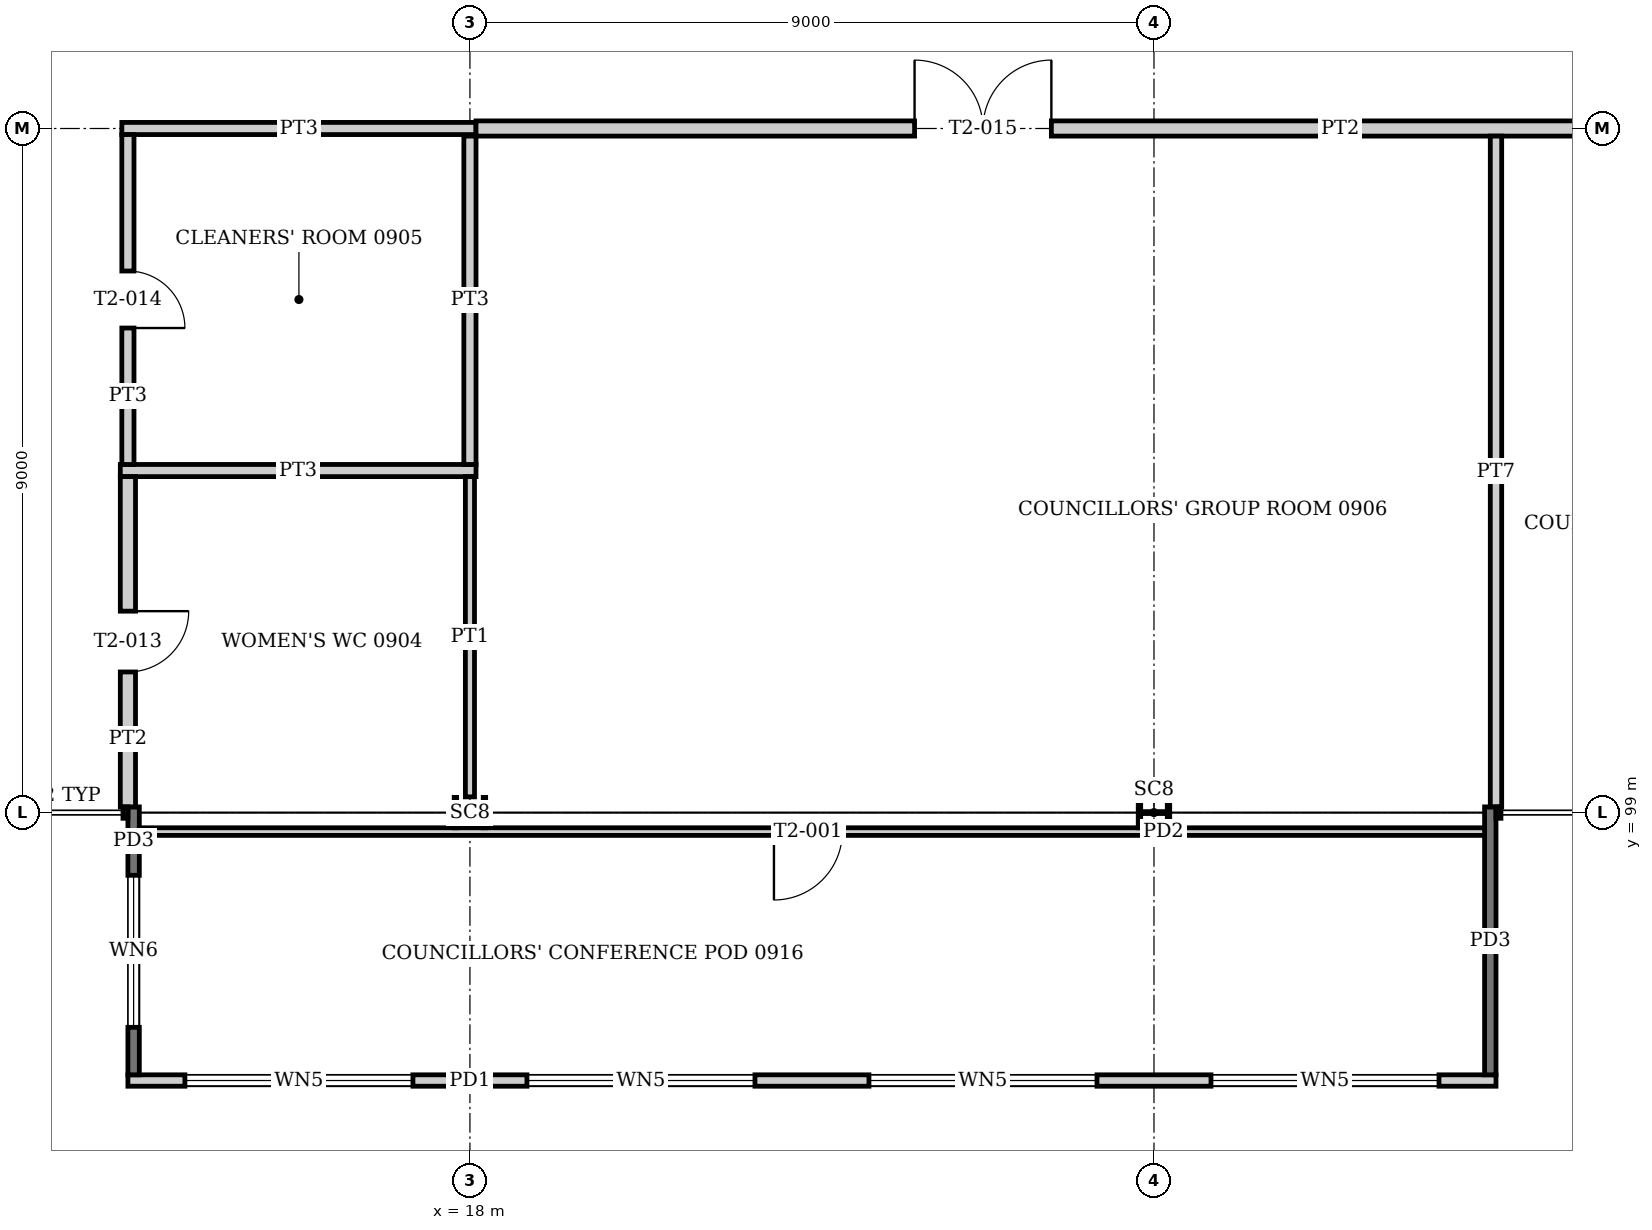
"""IFC4 building model, lengths in metres.
Left out: names, types, materials, properties, quantities, classifications, styles, units other than length and angle.
Written with IfcOpenShell. Run it as: python <this file> out.ifc"""

import sys

from ifc_helpers import new_model, si_unit, direction, frame, frame_2d, origin, origin_2d, place, context, subcontext, project, spatial, rectangle, i_section, extrude, element, fill, save


model = new_model("IFC4")
c1 = context("Model", 3, precision=1e-05, world=origin(), true_north=direction((0.0, 1.0)))
c2 = subcontext(c1, "Body", "Model", "MODEL_VIEW")
j1 = project(units=[si_unit("LENGTHUNIT", "METRE"), si_unit("PLANEANGLEUNIT", "RADIAN")], contexts=[c1])
p1 = place(None, origin())
s1 = spatial("IfcSite", under=j1, at=p1, CompositionType="ELEMENT")
p2 = place(p1, origin())
s2 = spatial("IfcBuilding", under=s1, at=p2, CompositionType="ELEMENT")
p3 = place(p2, frame((0.0, 0.0, 39.2)))
s3 = spatial("IfcBuildingStorey", under=s2, at=p3, CompositionType="ELEMENT", Elevation=39.2)
for number, where, z_axis, x_axis in (
    (1, (18.0, 99.0, 0.0), (0.0, 0.0, 1.0), (0.0, 1.0, 0.0)),
    (2, (27.0, 99.0, 0.0), (0.0, 0.0, 1.0), (0.0, 1.0, 0.0)),
):
    element("IfcColumn", number, at=place(p3, frame(where, z_axis=z_axis, x_axis=x_axis)), inside=s3, PredefinedType="COLUMN", context=c2, shape_type="SweptSolid", body=[
        extrude(i_section(OverallWidth=0.4, OverallDepth=0.414, WebThickness=0.025, FlangeThickness=0.032, at=origin_2d()), origin(), (0.0, 0.0, 1.0), 4.0),
    ])
p4 = place(p3, frame((13.5, 95.475, 0.0), z_axis=(0.0, 0.0, 1.0), x_axis=(1.0, 0.0, 0.0)))
e3 = element("IfcWall", 3, at=p4, inside=s3, PredefinedType="SOLIDWALL", context=c2, shape_type="SweptSolid", body=[
    extrude(rectangle(XDim=18.0, YDim=0.15, at=frame_2d((9.0, 0.0))), origin(), (0.0, 0.0, 1.0), 2.6),
])
p5 = place(p4, frame((0.75, 0.0, 0.9)))
e4 = element("IfcOpeningElement", 4, at=p5, cuts=e3, PredefinedType="OPENING", context=c2, shape_type="SweptSolid", body=[
    extrude(rectangle(XDim=3.0, YDim=1.4, at=frame_2d((1.5, 0.7))), frame((0.0, 0.085, 0.0), z_axis=(0.0, -1.0, 0.0), x_axis=(1.0, 0.0, 0.0)), (0.0, 0.0, 1.0), 0.17),
])
p6 = place(p4, frame((5.25, 0.0, 0.9)))
e5 = element("IfcOpeningElement", 5, at=p6, cuts=e3, PredefinedType="OPENING", context=c2, shape_type="SweptSolid", body=[
    extrude(rectangle(XDim=3.0, YDim=1.4, at=frame_2d((1.5, 0.7))), frame((0.0, 0.085, 0.0), z_axis=(0.0, -1.0, 0.0), x_axis=(1.0, 0.0, 0.0)), (0.0, 0.0, 1.0), 0.17),
])
p7 = place(p4, frame((9.75, 0.0, 0.9)))
e6 = element("IfcOpeningElement", 6, at=p7, cuts=e3, PredefinedType="OPENING", context=c2, shape_type="SweptSolid", body=[
    extrude(rectangle(XDim=3.0, YDim=1.4, at=frame_2d((1.5, 0.7))), frame((0.0, 0.085, 0.0), z_axis=(0.0, -1.0, 0.0), x_axis=(1.0, 0.0, 0.0)), (0.0, 0.0, 1.0), 0.17),
])
p8 = place(p4, frame((14.25, 0.0, 0.9)))
e7 = element("IfcOpeningElement", 7, at=p8, cuts=e3, PredefinedType="OPENING", context=c2, shape_type="SweptSolid", body=[
    extrude(rectangle(XDim=3.0, YDim=1.4, at=frame_2d((1.5, 0.7))), frame((0.0, 0.085, 0.0), z_axis=(0.0, -1.0, 0.0), x_axis=(1.0, 0.0, 0.0)), (0.0, 0.0, 1.0), 0.17),
])
p9 = place(p3, frame((13.575, 95.55, -0.15), z_axis=(0.0, 0.0, 1.0), x_axis=(0.0, 1.0, 0.0)))
e8 = element("IfcWall", 8, at=p9, inside=s3, PredefinedType="SOLIDWALL", context=c2, shape_type="SweptSolid", body=[
    extrude(rectangle(XDim=3.525, YDim=0.15, at=frame_2d((1.762, 0.0))), origin(), (0.0, 0.0, 1.0), 2.75),
])
p10 = place(p9, frame((0.625, 0.0, 1.05)))
e9 = element("IfcOpeningElement", 9, at=p10, cuts=e8, PredefinedType="OPENING", context=c2, shape_type="SweptSolid", body=[
    extrude(rectangle(XDim=2.0, YDim=1.4, at=frame_2d((1.0, 0.7))), frame((0.0, 0.085, 0.0), z_axis=(0.0, -1.0, 0.0), x_axis=(1.0, 0.0, 0.0)), (0.0, 0.0, 1.0), 0.17),
])
p11 = place(p3, frame((31.425, 95.55, -0.15), z_axis=(0.0, 0.0, 1.0), x_axis=(0.0, 1.0, 0.0)))
e10 = element("IfcWall", 10, at=p11, inside=s3, PredefinedType="SOLIDWALL", context=c2, shape_type="SweptSolid", body=[
    extrude(rectangle(XDim=3.525, YDim=0.15, at=frame_2d((1.762, 0.0))), origin(), (0.0, 0.0, 1.0), 2.75),
])
p12 = place(p3, frame((13.65, 98.75, 0.0), z_axis=(0.0, 0.0, 1.0), x_axis=(1.0, 0.0, 0.0)))
e11 = element("IfcWall", 11, at=p12, inside=s3, PredefinedType="PARTITIONING", context=c2, shape_type="SweptSolid", body=[
    extrude(rectangle(XDim=17.7, YDim=0.1, at=frame_2d((8.85, 0.0))), origin(), (0.0, 0.0, 1.0), 2.6),
])
p13 = place(p12, frame((8.35, 0.0, 0.0)))
e12 = element("IfcOpeningElement", 12, at=p13, cuts=e11, PredefinedType="OPENING", context=c2, shape_type="SweptSolid", body=[
    extrude(rectangle(XDim=0.9, YDim=2.1, at=frame_2d((0.45, 1.05))), frame((0.0, 0.06, 0.0), z_axis=(0.0, -1.0, 0.0), x_axis=(1.0, 0.0, 0.0)), (0.0, 0.0, 1.0), 0.12),
])
p14 = place(p3, frame((13.4, 103.5, 0.0), z_axis=(0.0, 0.0, 1.0), x_axis=(1.0, 0.0, 0.0)))
e13 = element("IfcWall", 13, at=p14, inside=s3, PredefinedType="PARTITIONING", context=c2, shape_type="SweptSolid", body=[
    extrude(rectangle(XDim=4.68, YDim=0.16, at=frame_2d((2.34, 0.0))), origin(), (0.0, 0.0, 1.0), 3.05),
])
p15 = place(p3, frame((13.42, 108.0, 0.0), z_axis=(0.0, 0.0, 1.0), x_axis=(1.0, 0.0, 0.0)))
e14 = element("IfcWall", 14, at=p15, inside=s3, PredefinedType="PARTITIONING", context=c2, shape_type="SweptSolid", body=[
    extrude(rectangle(XDim=4.66, YDim=0.16, at=frame_2d((2.33, 0.0))), origin(), (0.0, 0.0, 1.0), 3.05),
])
p16 = place(p3, frame((18.08, 108.0, 0.0), z_axis=(0.0, 0.0, 1.0), x_axis=(1.0, 0.0, 0.0)))
e15 = element("IfcWall", 15, at=p16, inside=s3, PredefinedType="PARTITIONING", context=c2, shape_type="SweptSolid", body=[
    extrude(rectangle(XDim=22.52, YDim=0.2, at=frame_2d((11.26, 0.0))), origin(), (0.0, 0.0, 1.0), 3.05),
])
p17 = place(p16, frame((5.77, 0.0, 0.0)))
e16 = element("IfcOpeningElement", 16, at=p17, cuts=e15, PredefinedType="OPENING", context=c2, shape_type="SweptSolid", body=[
    extrude(rectangle(XDim=1.8, YDim=2.1, at=frame_2d((0.9, 1.05))), frame((0.0, 0.11, 0.0), z_axis=(0.0, -1.0, 0.0), x_axis=(1.0, 0.0, 0.0)), (0.0, 0.0, 1.0), 0.22),
])
p18 = place(p16, frame((15.17, 0.0, 0.0)))
e17 = element("IfcOpeningElement", 17, at=p18, cuts=e15, PredefinedType="OPENING", context=c2, shape_type="SweptSolid", body=[
    extrude(rectangle(XDim=1.0, YDim=2.1, at=frame_2d((0.5, 1.05))), frame((0.0, 0.11, 0.0), z_axis=(0.0, -1.0, 0.0), x_axis=(1.0, 0.0, 0.0)), (0.0, 0.0, 1.0), 0.22),
])
p19 = place(p16, frame((19.67, 0.0, 0.0)))
e18 = element("IfcOpeningElement", 18, at=p19, cuts=e15, PredefinedType="OPENING", context=c2, shape_type="SweptSolid", body=[
    extrude(rectangle(XDim=1.0, YDim=2.1, at=frame_2d((0.5, 1.05))), frame((0.0, 0.11, 0.0), z_axis=(0.0, -1.0, 0.0), x_axis=(1.0, 0.0, 0.0)), (0.0, 0.0, 1.0), 0.22),
])
p20 = place(p3, frame((13.5, 99.075, 0.0), z_axis=(0.0, 0.0, 1.0), x_axis=(0.0, 1.0, 0.0)))
e19 = element("IfcWall", 19, at=p20, inside=s3, PredefinedType="PARTITIONING", context=c2, shape_type="SweptSolid", body=[
    extrude(rectangle(XDim=4.345, YDim=0.2, at=frame_2d((2.172, 0.0))), origin(), (0.0, 0.0, 1.0), 3.05),
])
p21 = place(p20, frame((1.775, 0.0, 0.0)))
e20 = element("IfcOpeningElement", 20, at=p21, cuts=e19, PredefinedType="OPENING", context=c2, shape_type="SweptSolid", body=[
    extrude(rectangle(XDim=0.8, YDim=2.1, at=frame_2d((0.4, 1.05))), frame((0.0, 0.11, 0.0), z_axis=(0.0, -1.0, 0.0), x_axis=(1.0, 0.0, 0.0)), (0.0, 0.0, 1.0), 0.22),
])
p22 = place(p3, frame((13.5, 103.58, 0.0), z_axis=(0.0, 0.0, 1.0), x_axis=(0.0, 1.0, 0.0)))
e21 = element("IfcWall", 21, at=p22, inside=s3, PredefinedType="PARTITIONING", context=c2, shape_type="SweptSolid", body=[
    extrude(rectangle(XDim=4.34, YDim=0.16, at=frame_2d((2.17, 0.0))), origin(), (0.0, 0.0, 1.0), 3.05),
])
p23 = place(p22, frame((1.795, 0.0, 0.0)))
e22 = element("IfcOpeningElement", 22, at=p23, cuts=e21, PredefinedType="OPENING", context=c2, shape_type="SweptSolid", body=[
    extrude(rectangle(XDim=0.75, YDim=2.1, at=frame_2d((0.375, 1.05))), frame((0.0, 0.09, 0.0), z_axis=(0.0, -1.0, 0.0), x_axis=(1.0, 0.0, 0.0)), (0.0, 0.0, 1.0), 0.18),
])
p24 = place(p3, frame((18.0, 99.207, 0.0), z_axis=(0.0, 0.0, 1.0), x_axis=(0.0, 1.0, 0.0)))
e23 = element("IfcWall", 23, at=p24, inside=s3, PredefinedType="PARTITIONING", context=c2, shape_type="SweptSolid", body=[
    extrude(rectangle(XDim=4.213, YDim=0.12, at=frame_2d((2.106, 0.0))), origin(), (0.0, 0.0, 1.0), 3.05),
])
p25 = place(p3, frame((18.0, 103.58, 0.0), z_axis=(0.0, 0.0, 1.0), x_axis=(0.0, 1.0, 0.0)))
e24 = element("IfcWall", 24, at=p25, inside=s3, PredefinedType="PARTITIONING", context=c2, shape_type="SweptSolid", body=[
    extrude(rectangle(XDim=4.32, YDim=0.16, at=frame_2d((2.16, 0.0))), origin(), (0.0, 0.0, 1.0), 3.05),
])
p26 = place(p3, frame((31.5, 99.075, 0.0), z_axis=(0.0, 0.0, 1.0), x_axis=(0.0, 1.0, 0.0)))
e25 = element("IfcWall", 25, at=p26, inside=s3, PredefinedType="PARTITIONING", context=c2, shape_type="SweptSolid", body=[
    extrude(rectangle(XDim=8.825, YDim=0.15, at=frame_2d((4.413, 0.0))), origin(), (0.0, 0.0, 1.0), 3.05),
])
p27 = place(p5, origin())
e26 = element("IfcWindow", 26, at=p27, inside=s3, PartitioningType="SINGLE_PANEL", PredefinedType="WINDOW", context=c2, shape_type="SweptSolid", body=[
    extrude(rectangle(XDim=3.0, YDim=1.4, at=frame_2d((1.5, 0.7))), frame((0.0, 0.03, 0.0), z_axis=(0.0, -1.0, 0.0), x_axis=(1.0, 0.0, 0.0)), (0.0, 0.0, 1.0), 0.06),
])
fill(e4, e26)
p28 = place(p6, origin())
e27 = element("IfcWindow", 27, at=p28, inside=s3, PartitioningType="SINGLE_PANEL", PredefinedType="WINDOW", context=c2, shape_type="SweptSolid", body=[
    extrude(rectangle(XDim=3.0, YDim=1.4, at=frame_2d((1.5, 0.7))), frame((0.0, 0.03, 0.0), z_axis=(0.0, -1.0, 0.0), x_axis=(1.0, 0.0, 0.0)), (0.0, 0.0, 1.0), 0.06),
])
fill(e5, e27)
p29 = place(p7, origin())
e28 = element("IfcWindow", 28, at=p29, inside=s3, PartitioningType="SINGLE_PANEL", PredefinedType="WINDOW", context=c2, shape_type="SweptSolid", body=[
    extrude(rectangle(XDim=3.0, YDim=1.4, at=frame_2d((1.5, 0.7))), frame((0.0, 0.03, 0.0), z_axis=(0.0, -1.0, 0.0), x_axis=(1.0, 0.0, 0.0)), (0.0, 0.0, 1.0), 0.06),
])
fill(e6, e28)
p30 = place(p8, origin())
e29 = element("IfcWindow", 29, at=p30, inside=s3, PartitioningType="SINGLE_PANEL", PredefinedType="WINDOW", context=c2, shape_type="SweptSolid", body=[
    extrude(rectangle(XDim=3.0, YDim=1.4, at=frame_2d((1.5, 0.7))), frame((0.0, 0.03, 0.0), z_axis=(0.0, -1.0, 0.0), x_axis=(1.0, 0.0, 0.0)), (0.0, 0.0, 1.0), 0.06),
])
fill(e7, e29)
p31 = place(p10, origin())
e30 = element("IfcWindow", 30, at=p31, inside=s3, PartitioningType="SINGLE_PANEL", PredefinedType="WINDOW", context=c2, shape_type="SweptSolid", body=[
    extrude(rectangle(XDim=2.0, YDim=1.4, at=frame_2d((1.0, 0.7))), frame((0.0, 0.03, 0.0), z_axis=(0.0, -1.0, 0.0), x_axis=(1.0, 0.0, 0.0)), (0.0, 0.0, 1.0), 0.06),
])
fill(e9, e30)
p32 = place(p13, frame((0.9, 0.0, 0.0), z_axis=(0.0, 0.0, 1.0), x_axis=(-1.0, 0.0, 0.0)))
e31 = element("IfcDoor", 31, at=p32, inside=s3, OperationType="SINGLE_SWING_RIGHT", PredefinedType="DOOR", context=c2, shape_type="SweptSolid", body=[
    extrude(rectangle(XDim=0.9, YDim=2.1, at=frame_2d((0.45, 1.05))), frame((0.0, 0.025, 0.0), z_axis=(0.0, -1.0, 0.0), x_axis=(1.0, 0.0, 0.0)), (0.0, 0.0, 1.0), 0.05),
])
fill(e12, e31)
p33 = place(p21, frame((0.8, 0.0, 0.0), z_axis=(0.0, 0.0, 1.0), x_axis=(-1.0, 0.0, 0.0)))
e32 = element("IfcDoor", 32, at=p33, inside=s3, OperationType="SINGLE_SWING_LEFT", PredefinedType="DOOR", context=c2, shape_type="SweptSolid", body=[
    extrude(rectangle(XDim=0.8, YDim=2.1, at=frame_2d((0.4, 1.05))), frame((0.0, 0.025, 0.0), z_axis=(0.0, -1.0, 0.0), x_axis=(1.0, 0.0, 0.0)), (0.0, 0.0, 1.0), 0.05),
])
fill(e20, e32)
p34 = place(p23, frame((0.75, 0.0, 0.0), z_axis=(0.0, 0.0, 1.0), x_axis=(-1.0, 0.0, 0.0)))
e33 = element("IfcDoor", 33, at=p34, inside=s3, OperationType="SINGLE_SWING_RIGHT", PredefinedType="DOOR", context=c2, shape_type="SweptSolid", body=[
    extrude(rectangle(XDim=0.75, YDim=2.1, at=frame_2d((0.375, 1.05))), frame((0.0, 0.025, 0.0), z_axis=(0.0, -1.0, 0.0), x_axis=(1.0, 0.0, 0.0)), (0.0, 0.0, 1.0), 0.05),
])
fill(e22, e33)
p35 = place(p17, origin())
e34 = element("IfcDoor", 34, at=p35, inside=s3, OperationType="DOUBLE_DOOR_SINGLE_SWING", PredefinedType="DOOR", context=c2, shape_type="SweptSolid", body=[
    extrude(rectangle(XDim=1.8, YDim=2.1, at=frame_2d((0.9, 1.05))), frame((0.0, 0.025, 0.0), z_axis=(0.0, -1.0, 0.0), x_axis=(1.0, 0.0, 0.0)), (0.0, 0.0, 1.0), 0.05),
])
fill(e16, e34)
save(model, sys.argv[1])
